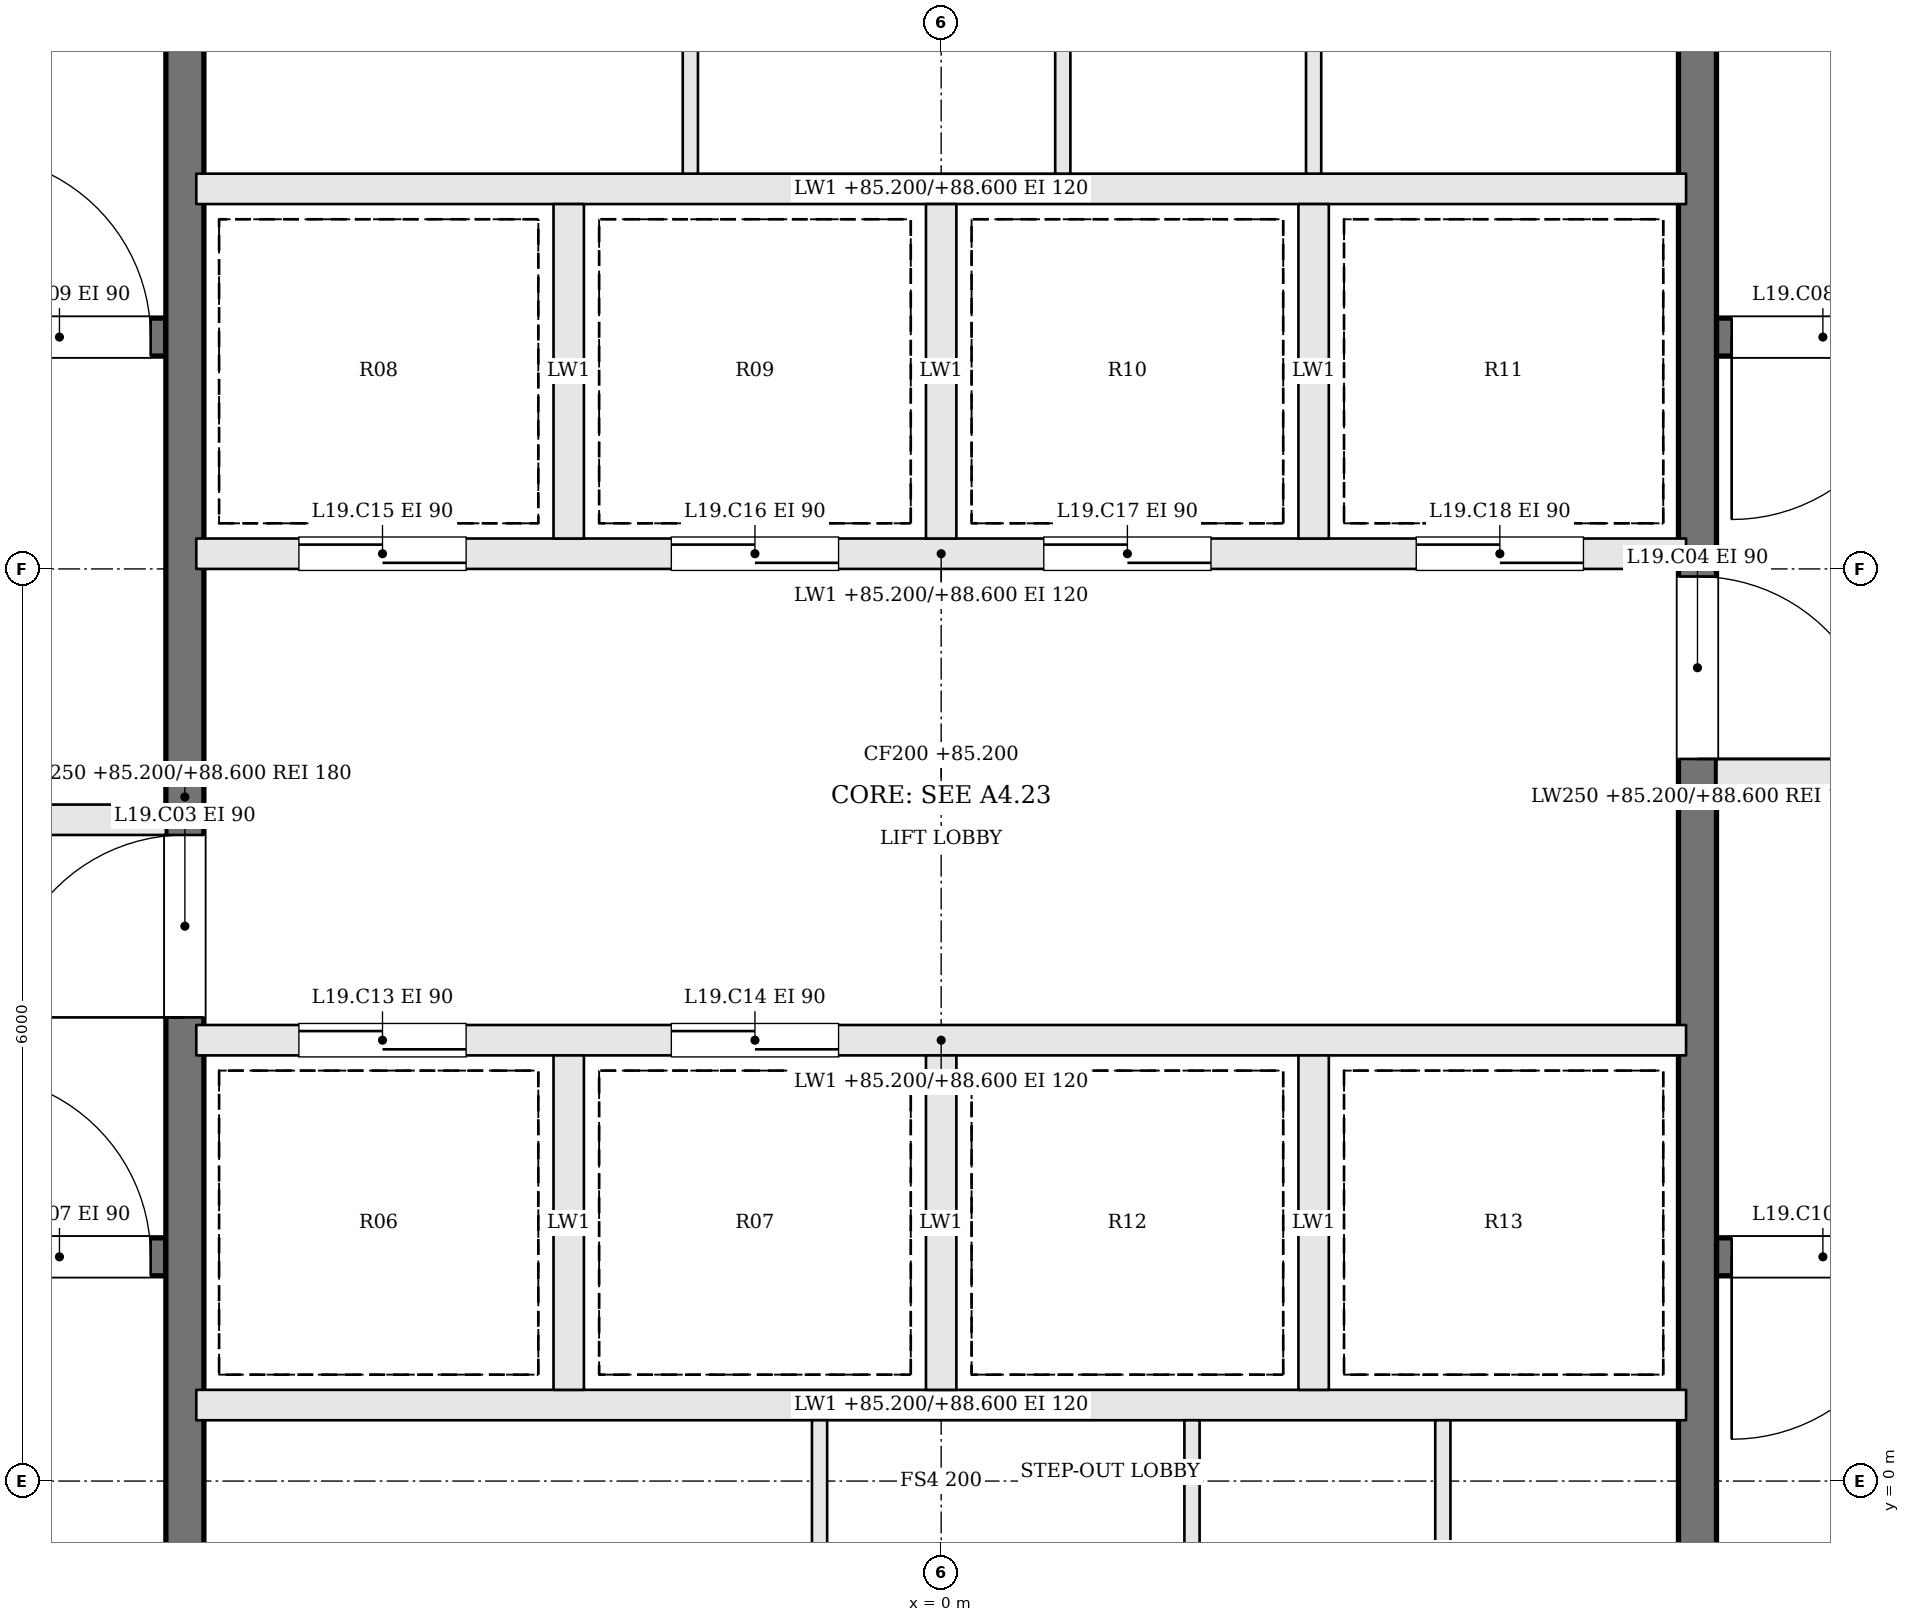
"""IFC4 building model, lengths in metres.
Left out: names, types, materials, properties, quantities, classifications, styles, units other than length and angle.
Written with IfcOpenShell. Run it as: python <this file> out.ifc"""

import sys

from ifc_helpers import new_model, si_unit, direction, frame, frame_2d, origin, place, context, subcontext, project, spatial, rectangle, extrude, element, fill, save


model = new_model("IFC4")
c1 = context("Model", 3, precision=1e-05, world=origin(), true_north=direction((0.0, 1.0)))
c2 = subcontext(c1, "Body", "Model", "MODEL_VIEW")
j1 = project(units=[si_unit("LENGTHUNIT", "METRE"), si_unit("PLANEANGLEUNIT", "RADIAN")], contexts=[c1])
p1 = place(None, origin())
s1 = spatial("IfcSite", under=j1, at=p1, CompositionType="ELEMENT")
p2 = place(p1, origin())
s2 = spatial("IfcBuilding", under=s1, at=p2, CompositionType="ELEMENT")
p3 = place(p2, frame((0.0, 0.0, 85.2)))
s3 = spatial("IfcBuildingStorey", under=s2, at=p3, CompositionType="ELEMENT", Elevation=85.2)
p4 = place(p3, frame((-11.9, 1.475, 0.0), z_axis=(0.0, 0.0, 1.0), x_axis=(1.0, 0.0, 0.0)))
e1 = element("IfcWall", 1, at=p4, inside=s3, PredefinedType="SOLIDWALL", context=c2, shape_type="SweptSolid", body=[
    extrude(rectangle(XDim=6.8, YDim=0.25, at=frame_2d((3.4, 0.0))), origin(), (0.0, 0.0, 1.0), 3.4),
])
p5 = place(p4, frame((5.5, 0.0, 0.0)))
e2 = element("IfcOpeningElement", 2, at=p5, cuts=e1, PredefinedType="OPENING", context=c2, shape_type="SweptSolid", body=[
    extrude(rectangle(XDim=1.2, YDim=2.1, at=frame_2d((0.6, 1.05))), frame((0.0, 0.135, 0.0), z_axis=(0.0, -1.0, 0.0), x_axis=(1.0, 0.0, 0.0)), (0.0, 0.0, 1.0), 0.27),
])
p6 = place(p3, frame((11.9, 7.525, 0.0), z_axis=(0.0, 0.0, 1.0), x_axis=(-1.0, 0.0, 0.0)))
e3 = element("IfcWall", 3, at=p6, inside=s3, PredefinedType="SOLIDWALL", context=c2, shape_type="SweptSolid", body=[
    extrude(rectangle(XDim=6.8, YDim=0.25, at=frame_2d((3.4, 0.0))), origin(), (0.0, 0.0, 1.0), 3.4),
])
p7 = place(p6, frame((5.5, 0.0, 0.0)))
e4 = element("IfcOpeningElement", 4, at=p7, cuts=e3, PredefinedType="OPENING", context=c2, shape_type="SweptSolid", body=[
    extrude(rectangle(XDim=1.2, YDim=2.1, at=frame_2d((0.6, 1.05))), frame((0.0, 0.135, 0.0), z_axis=(0.0, -1.0, 0.0), x_axis=(1.0, 0.0, 0.0)), (0.0, 0.0, 1.0), 0.27),
])
p8 = place(p3, frame((-11.9, 4.35, 0.0), z_axis=(0.0, 0.0, 1.0), x_axis=(1.0, 0.0, 0.0)))
e5 = element("IfcWall", 5, at=p8, inside=s3, PredefinedType="SOLIDWALL", context=c2, shape_type="SweptSolid", body=[
    extrude(rectangle(XDim=6.8, YDim=0.2, at=frame_2d((3.4, 0.0))), origin(), (0.0, 0.0, 1.0), 3.4),
])
p9 = place(p8, frame((4.1, 0.0, 0.0)))
e6 = element("IfcOpeningElement", 6, at=p9, cuts=e5, PredefinedType="OPENING", context=c2, shape_type="SweptSolid", body=[
    extrude(rectangle(XDim=1.2, YDim=2.1, at=frame_2d((0.6, 1.05))), frame((0.0, 0.11, 0.0), z_axis=(0.0, -1.0, 0.0), x_axis=(1.0, 0.0, 0.0)), (0.0, 0.0, 1.0), 0.22),
])
p10 = place(p8, frame((0.8, 0.0, 0.0)))
e7 = element("IfcOpeningElement", 7, at=p10, cuts=e5, PredefinedType="OPENING", context=c2, shape_type="SweptSolid", body=[
    extrude(rectangle(XDim=1.2, YDim=2.1, at=frame_2d((0.6, 1.05))), frame((0.0, 0.11, 0.0), z_axis=(0.0, -1.0, 0.0), x_axis=(1.0, 0.0, 0.0)), (0.0, 0.0, 1.0), 0.22),
])
p11 = place(p3, frame((11.9, 4.65, 0.0), z_axis=(0.0, 0.0, 1.0), x_axis=(-1.0, 0.0, 0.0)))
e8 = element("IfcWall", 8, at=p11, inside=s3, PredefinedType="SOLIDWALL", context=c2, shape_type="SweptSolid", body=[
    extrude(rectangle(XDim=6.8, YDim=0.2, at=frame_2d((3.4, 0.0))), origin(), (0.0, 0.0, 1.0), 3.4),
])
p12 = place(p11, frame((4.1, 0.0, 0.0)))
e9 = element("IfcOpeningElement", 9, at=p12, cuts=e8, PredefinedType="OPENING", context=c2, shape_type="SweptSolid", body=[
    extrude(rectangle(XDim=1.2, YDim=2.1, at=frame_2d((0.6, 1.05))), frame((0.0, 0.11, 0.0), z_axis=(0.0, -1.0, 0.0), x_axis=(1.0, 0.0, 0.0)), (0.0, 0.0, 1.0), 0.22),
])
p13 = place(p11, frame((0.8, 0.0, 0.0)))
e10 = element("IfcOpeningElement", 10, at=p13, cuts=e8, PredefinedType="OPENING", context=c2, shape_type="SweptSolid", body=[
    extrude(rectangle(XDim=1.2, YDim=2.1, at=frame_2d((0.6, 1.05))), frame((0.0, 0.11, 0.0), z_axis=(0.0, -1.0, 0.0), x_axis=(1.0, 0.0, 0.0)), (0.0, 0.0, 1.0), 0.22),
])
p14 = place(p3, frame((-11.9, 7.525, 0.0), z_axis=(0.0, 0.0, 1.0), x_axis=(1.0, 0.0, 0.0)))
e11 = element("IfcWall", 11, at=p14, inside=s3, PredefinedType="SOLIDWALL", context=c2, shape_type="SweptSolid", body=[
    extrude(rectangle(XDim=6.8, YDim=0.25, at=frame_2d((3.4, 0.0))), origin(), (0.0, 0.0, 1.0), 3.4),
])
p15 = place(p14, frame((5.5, 0.0, 0.0)))
e12 = element("IfcOpeningElement", 12, at=p15, cuts=e11, PredefinedType="OPENING", context=c2, shape_type="SweptSolid", body=[
    extrude(rectangle(XDim=1.2, YDim=2.1, at=frame_2d((0.6, 1.05))), frame((0.0, 0.135, 0.0), z_axis=(0.0, -1.0, 0.0), x_axis=(1.0, 0.0, 0.0)), (0.0, 0.0, 1.0), 0.27),
])
p16 = place(p3, frame((11.9, 1.475, 0.0), z_axis=(0.0, 0.0, 1.0), x_axis=(-1.0, 0.0, 0.0)))
e13 = element("IfcWall", 13, at=p16, inside=s3, PredefinedType="SOLIDWALL", context=c2, shape_type="SweptSolid", body=[
    extrude(rectangle(XDim=6.8, YDim=0.25, at=frame_2d((3.4, 0.0))), origin(), (0.0, 0.0, 1.0), 3.4),
])
p17 = place(p16, frame((5.5, 0.0, 0.0)))
e14 = element("IfcOpeningElement", 14, at=p17, cuts=e13, PredefinedType="OPENING", context=c2, shape_type="SweptSolid", body=[
    extrude(rectangle(XDim=1.2, YDim=2.1, at=frame_2d((0.6, 1.05))), frame((0.0, 0.135, 0.0), z_axis=(0.0, -1.0, 0.0), x_axis=(1.0, 0.0, 0.0)), (0.0, 0.0, 1.0), 0.27),
])
p18 = place(p3, frame((-4.975, -1.9, 0.0), z_axis=(0.0, 0.0, 1.0), x_axis=(0.0, 1.0, 0.0)))
e15 = element("IfcWall", 15, at=p18, inside=s3, PredefinedType="SOLIDWALL", context=c2, shape_type="SweptSolid", body=[
    extrude(rectangle(XDim=12.8, YDim=0.25, at=frame_2d((6.4, 0.0))), origin(), (0.0, 0.0, 1.0), 3.4),
])
p19 = place(p18, frame((4.95, 0.0, 0.0)))
e16 = element("IfcOpeningElement", 16, at=p19, cuts=e15, PredefinedType="OPENING", context=c2, shape_type="SweptSolid", body=[
    extrude(rectangle(XDim=1.2, YDim=2.1, at=frame_2d((0.6, 1.05))), frame((0.0, 0.135, 0.0), z_axis=(0.0, -1.0, 0.0), x_axis=(1.0, 0.0, 0.0)), (0.0, 0.0, 1.0), 0.27),
])
p20 = place(p3, frame((4.975, 10.9, 0.0), z_axis=(0.0, 0.0, 1.0), x_axis=(0.0, -1.0, 0.0)))
e17 = element("IfcWall", 17, at=p20, inside=s3, PredefinedType="SOLIDWALL", context=c2, shape_type="SweptSolid", body=[
    extrude(rectangle(XDim=12.8, YDim=0.25, at=frame_2d((6.4, 0.0))), origin(), (0.0, 0.0, 1.0), 3.4),
])
p21 = place(p20, frame((4.95, 0.0, 0.0)))
e18 = element("IfcOpeningElement", 18, at=p21, cuts=e17, PredefinedType="OPENING", context=c2, shape_type="SweptSolid", body=[
    extrude(rectangle(XDim=1.2, YDim=2.1, at=frame_2d((0.6, 1.05))), frame((0.0, 0.135, 0.0), z_axis=(0.0, -1.0, 0.0), x_axis=(1.0, 0.0, 0.0)), (0.0, 0.0, 1.0), 0.27),
])
p22 = place(p3, frame((-4.9, 0.5, 0.0), z_axis=(0.0, 0.0, 1.0), x_axis=(1.0, 0.0, 0.0)))
e19 = element("IfcWall", 19, at=p22, inside=s3, PredefinedType="SOLIDWALL", context=c2, shape_type="SweptSolid", body=[
    extrude(rectangle(XDim=9.8, YDim=0.2, at=frame_2d((4.9, 0.0))), origin(), (0.0, 0.0, 1.0), 3.4),
])
p23 = place(p3, frame((-4.9, 2.9, 0.0), z_axis=(0.0, 0.0, 1.0), x_axis=(1.0, 0.0, 0.0)))
e20 = element("IfcWall", 20, at=p23, inside=s3, PredefinedType="SOLIDWALL", context=c2, shape_type="SweptSolid", body=[
    extrude(rectangle(XDim=9.8, YDim=0.2, at=frame_2d((4.9, 0.0))), origin(), (0.0, 0.0, 1.0), 3.4),
])
p24 = place(p23, frame((0.675, 0.0, 0.0)))
e21 = element("IfcOpeningElement", 21, at=p24, cuts=e20, PredefinedType="OPENING", context=c2, shape_type="SweptSolid", body=[
    extrude(rectangle(XDim=1.1, YDim=2.1, at=frame_2d((0.55, 1.05))), frame((0.0, 0.11, 0.0), z_axis=(0.0, -1.0, 0.0), x_axis=(1.0, 0.0, 0.0)), (0.0, 0.0, 1.0), 0.22),
])
p25 = place(p23, frame((3.125, 0.0, 0.0)))
e22 = element("IfcOpeningElement", 22, at=p25, cuts=e20, PredefinedType="OPENING", context=c2, shape_type="SweptSolid", body=[
    extrude(rectangle(XDim=1.1, YDim=2.1, at=frame_2d((0.55, 1.05))), frame((0.0, 0.11, 0.0), z_axis=(0.0, -1.0, 0.0), x_axis=(1.0, 0.0, 0.0)), (0.0, 0.0, 1.0), 0.22),
])
p26 = place(p3, frame((-4.9, 6.1, 0.0), z_axis=(0.0, 0.0, 1.0), x_axis=(1.0, 0.0, 0.0)))
e23 = element("IfcWall", 23, at=p26, inside=s3, PredefinedType="SOLIDWALL", context=c2, shape_type="SweptSolid", body=[
    extrude(rectangle(XDim=9.8, YDim=0.2, at=frame_2d((4.9, 0.0))), origin(), (0.0, 0.0, 1.0), 3.4),
])
p27 = place(p26, frame((0.675, 0.0, 0.0)))
e24 = element("IfcOpeningElement", 24, at=p27, cuts=e23, PredefinedType="OPENING", context=c2, shape_type="SweptSolid", body=[
    extrude(rectangle(XDim=1.1, YDim=2.1, at=frame_2d((0.55, 1.05))), frame((0.0, 0.11, 0.0), z_axis=(0.0, -1.0, 0.0), x_axis=(1.0, 0.0, 0.0)), (0.0, 0.0, 1.0), 0.22),
])
p28 = place(p26, frame((3.125, 0.0, 0.0)))
e25 = element("IfcOpeningElement", 25, at=p28, cuts=e23, PredefinedType="OPENING", context=c2, shape_type="SweptSolid", body=[
    extrude(rectangle(XDim=1.1, YDim=2.1, at=frame_2d((0.55, 1.05))), frame((0.0, 0.11, 0.0), z_axis=(0.0, -1.0, 0.0), x_axis=(1.0, 0.0, 0.0)), (0.0, 0.0, 1.0), 0.22),
])
p29 = place(p26, frame((5.575, 0.0, 0.0)))
e26 = element("IfcOpeningElement", 26, at=p29, cuts=e23, PredefinedType="OPENING", context=c2, shape_type="SweptSolid", body=[
    extrude(rectangle(XDim=1.1, YDim=2.1, at=frame_2d((0.55, 1.05))), frame((0.0, 0.11, 0.0), z_axis=(0.0, -1.0, 0.0), x_axis=(1.0, 0.0, 0.0)), (0.0, 0.0, 1.0), 0.22),
])
p30 = place(p26, frame((8.025, 0.0, 0.0)))
e27 = element("IfcOpeningElement", 27, at=p30, cuts=e23, PredefinedType="OPENING", context=c2, shape_type="SweptSolid", body=[
    extrude(rectangle(XDim=1.1, YDim=2.1, at=frame_2d((0.55, 1.05))), frame((0.0, 0.11, 0.0), z_axis=(0.0, -1.0, 0.0), x_axis=(1.0, 0.0, 0.0)), (0.0, 0.0, 1.0), 0.22),
])
p31 = place(p3, frame((-4.9, 8.5, 0.0), z_axis=(0.0, 0.0, 1.0), x_axis=(1.0, 0.0, 0.0)))
e28 = element("IfcWall", 28, at=p31, inside=s3, PredefinedType="SOLIDWALL", context=c2, shape_type="SweptSolid", body=[
    extrude(rectangle(XDim=9.8, YDim=0.2, at=frame_2d((4.9, 0.0))), origin(), (0.0, 0.0, 1.0), 3.4),
])
for number, where, z_axis, x_axis in (
    (29, (-2.45, 0.6, 0.0), (0.0, 0.0, 1.0), (0.0, 1.0, 0.0)),
    (30, (0.0, 0.6, 0.0), (0.0, 0.0, 1.0), (0.0, 1.0, 0.0)),
    (31, (2.45, 0.6, 0.0), (0.0, 0.0, 1.0), (0.0, 1.0, 0.0)),
    (32, (-2.45, 6.2, 0.0), (0.0, 0.0, 1.0), (0.0, 1.0, 0.0)),
    (33, (0.0, 6.2, 0.0), (0.0, 0.0, 1.0), (0.0, 1.0, 0.0)),
    (34, (2.45, 6.2, 0.0), (0.0, 0.0, 1.0), (0.0, 1.0, 0.0)),
):
    element("IfcWall", number, at=place(p3, frame(where, z_axis=z_axis, x_axis=x_axis)), inside=s3, PredefinedType="SOLIDWALL", context=c2, shape_type="SweptSolid", body=[
        extrude(rectangle(XDim=2.2, YDim=0.2, at=frame_2d((1.1, 0.0))), origin(), (0.0, 0.0, 1.0), 3.4),
    ])
for number, where, z_axis, x_axis in (
    (35, (-0.8, -1.9, 0.0), (0.0, 0.0, 1.0), (0.0, 1.0, 0.0)),
    (36, (1.65, -1.9, 0.0), (0.0, 0.0, 1.0), (0.0, 1.0, 0.0)),
    (37, (3.3, -1.9, 0.0), (0.0, 0.0, 1.0), (0.0, 1.0, 0.0)),
    (38, (-1.65, 8.6, 0.0), (0.0, 0.0, 1.0), (0.0, 1.0, 0.0)),
    (39, (0.8, 8.6, 0.0), (0.0, 0.0, 1.0), (0.0, 1.0, 0.0)),
    (40, (2.45, 8.6, 0.0), (0.0, 0.0, 1.0), (0.0, 1.0, 0.0)),
):
    element("IfcWall", number, at=place(p3, frame(where, z_axis=z_axis, x_axis=x_axis)), inside=s3, PredefinedType="PARTITIONING", context=c2, shape_type="SweptSolid", body=[
        extrude(rectangle(XDim=2.3, YDim=0.1, at=frame_2d((1.15, 0.0))), origin(), (0.0, 0.0, 1.0), 3.4),
    ])
p32 = place(p19, origin())
e41 = element("IfcDoor", 41, at=p32, inside=s3, OperationType="SINGLE_SWING_LEFT", PredefinedType="DOOR", context=c2, shape_type="SweptSolid", body=[
    extrude(rectangle(XDim=1.2, YDim=2.1, at=frame_2d((0.6, 1.05))), frame((0.0, 0.025, 0.0), z_axis=(0.0, -1.0, 0.0), x_axis=(1.0, 0.0, 0.0)), (0.0, 0.0, 1.0), 0.05),
])
fill(e16, e41)
p33 = place(p21, origin())
e42 = element("IfcDoor", 42, at=p33, inside=s3, OperationType="SINGLE_SWING_RIGHT", PredefinedType="DOOR", context=c2, shape_type="SweptSolid", body=[
    extrude(rectangle(XDim=1.2, YDim=2.1, at=frame_2d((0.6, 1.05))), frame((0.0, 0.025, 0.0), z_axis=(0.0, -1.0, 0.0), x_axis=(1.0, 0.0, 0.0)), (0.0, 0.0, 1.0), 0.05),
])
fill(e18, e42)
p34 = place(p5, origin())
e43 = element("IfcDoor", 43, at=p34, inside=s3, OperationType="SINGLE_SWING_LEFT", PredefinedType="DOOR", context=c2, shape_type="SweptSolid", body=[
    extrude(rectangle(XDim=1.2, YDim=2.1, at=frame_2d((0.6, 1.05))), frame((0.0, 0.025, 0.0), z_axis=(0.0, -1.0, 0.0), x_axis=(1.0, 0.0, 0.0)), (0.0, 0.0, 1.0), 0.05),
])
fill(e2, e43)
p35 = place(p7, origin())
e44 = element("IfcDoor", 44, at=p35, inside=s3, OperationType="SINGLE_SWING_RIGHT", PredefinedType="DOOR", context=c2, shape_type="SweptSolid", body=[
    extrude(rectangle(XDim=1.2, YDim=2.1, at=frame_2d((0.6, 1.05))), frame((0.0, 0.025, 0.0), z_axis=(0.0, -1.0, 0.0), x_axis=(1.0, 0.0, 0.0)), (0.0, 0.0, 1.0), 0.05),
])
fill(e4, e44)
p36 = place(p15, origin())
e45 = element("IfcDoor", 45, at=p36, inside=s3, OperationType="SINGLE_SWING_LEFT", PredefinedType="DOOR", context=c2, shape_type="SweptSolid", body=[
    extrude(rectangle(XDim=1.2, YDim=2.1, at=frame_2d((0.6, 1.05))), frame((0.0, 0.025, 0.0), z_axis=(0.0, -1.0, 0.0), x_axis=(1.0, 0.0, 0.0)), (0.0, 0.0, 1.0), 0.05),
])
fill(e12, e45)
p37 = place(p17, origin())
e46 = element("IfcDoor", 46, at=p37, inside=s3, OperationType="SINGLE_SWING_RIGHT", PredefinedType="DOOR", context=c2, shape_type="SweptSolid", body=[
    extrude(rectangle(XDim=1.2, YDim=2.1, at=frame_2d((0.6, 1.05))), frame((0.0, 0.025, 0.0), z_axis=(0.0, -1.0, 0.0), x_axis=(1.0, 0.0, 0.0)), (0.0, 0.0, 1.0), 0.05),
])
fill(e14, e46)
p38 = place(p24, origin())
e47 = element("IfcDoor", 47, at=p38, inside=s3, OperationType="SLIDING_TO_RIGHT", PredefinedType="DOOR", context=c2, shape_type="SweptSolid", body=[
    extrude(rectangle(XDim=1.1, YDim=2.1, at=frame_2d((0.55, 1.05))), frame((0.0, 0.025, 0.0), z_axis=(0.0, -1.0, 0.0), x_axis=(1.0, 0.0, 0.0)), (0.0, 0.0, 1.0), 0.05),
])
fill(e21, e47)
p39 = place(p25, origin())
e48 = element("IfcDoor", 48, at=p39, inside=s3, OperationType="SLIDING_TO_LEFT", PredefinedType="DOOR", context=c2, shape_type="SweptSolid", body=[
    extrude(rectangle(XDim=1.1, YDim=2.1, at=frame_2d((0.55, 1.05))), frame((0.0, 0.025, 0.0), z_axis=(0.0, -1.0, 0.0), x_axis=(1.0, 0.0, 0.0)), (0.0, 0.0, 1.0), 0.05),
])
fill(e22, e48)
p40 = place(p27, origin())
e49 = element("IfcDoor", 49, at=p40, inside=s3, OperationType="SLIDING_TO_RIGHT", PredefinedType="DOOR", context=c2, shape_type="SweptSolid", body=[
    extrude(rectangle(XDim=1.1, YDim=2.1, at=frame_2d((0.55, 1.05))), frame((0.0, 0.025, 0.0), z_axis=(0.0, -1.0, 0.0), x_axis=(1.0, 0.0, 0.0)), (0.0, 0.0, 1.0), 0.05),
])
fill(e24, e49)
p41 = place(p28, origin())
e50 = element("IfcDoor", 50, at=p41, inside=s3, OperationType="SLIDING_TO_LEFT", PredefinedType="DOOR", context=c2, shape_type="SweptSolid", body=[
    extrude(rectangle(XDim=1.1, YDim=2.1, at=frame_2d((0.55, 1.05))), frame((0.0, 0.025, 0.0), z_axis=(0.0, -1.0, 0.0), x_axis=(1.0, 0.0, 0.0)), (0.0, 0.0, 1.0), 0.05),
])
fill(e25, e50)
p42 = place(p29, origin())
e51 = element("IfcDoor", 51, at=p42, inside=s3, OperationType="SLIDING_TO_RIGHT", PredefinedType="DOOR", context=c2, shape_type="SweptSolid", body=[
    extrude(rectangle(XDim=1.1, YDim=2.1, at=frame_2d((0.55, 1.05))), frame((0.0, 0.025, 0.0), z_axis=(0.0, -1.0, 0.0), x_axis=(1.0, 0.0, 0.0)), (0.0, 0.0, 1.0), 0.05),
])
fill(e26, e51)
p43 = place(p30, origin())
e52 = element("IfcDoor", 52, at=p43, inside=s3, OperationType="SLIDING_TO_LEFT", PredefinedType="DOOR", context=c2, shape_type="SweptSolid", body=[
    extrude(rectangle(XDim=1.1, YDim=2.1, at=frame_2d((0.55, 1.05))), frame((0.0, 0.025, 0.0), z_axis=(0.0, -1.0, 0.0), x_axis=(1.0, 0.0, 0.0)), (0.0, 0.0, 1.0), 0.05),
])
fill(e27, e52)
save(model, sys.argv[1])
